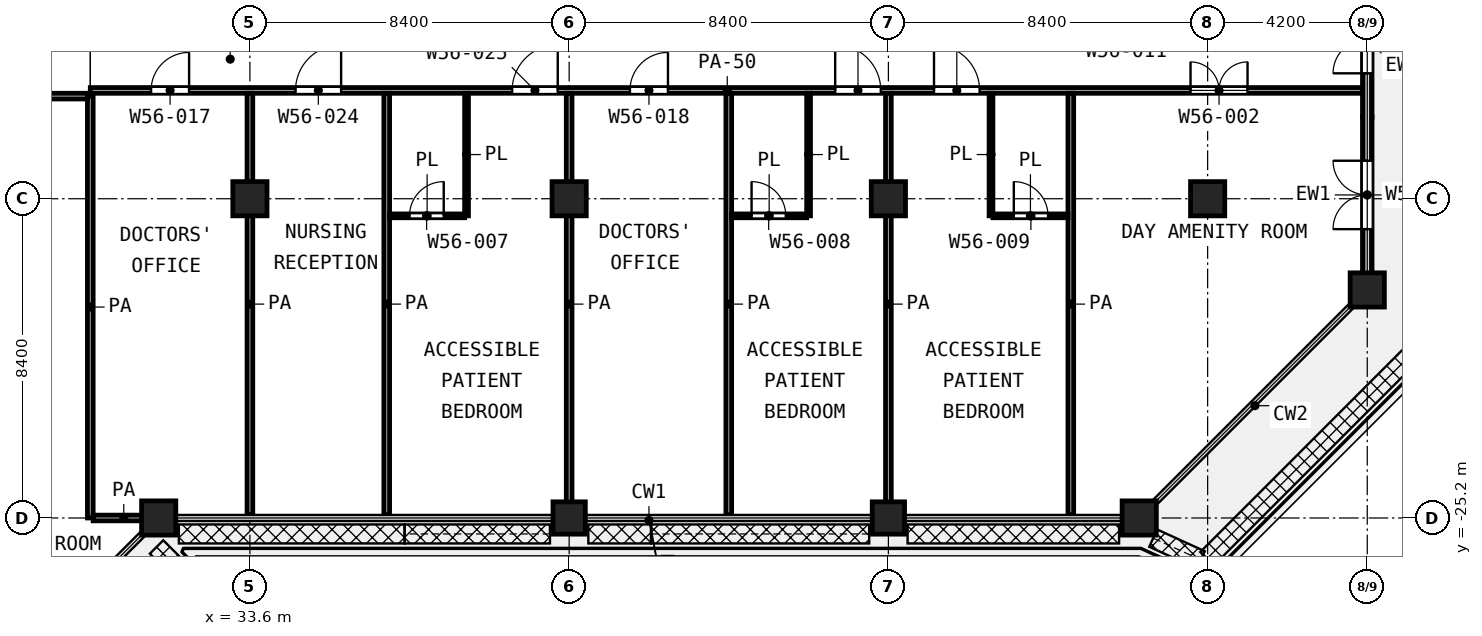
"""IFC4 building model, lengths in metres.
Left out: names, types, materials, properties, quantities, classifications, styles, units other than length and angle.
Written with IfcOpenShell. Run it as: python <this file> out.ifc"""

import sys

from ifc_helpers import new_model, si_unit, direction, frame, frame_2d, origin, origin_2d, place, context, subcontext, project, spatial, rectangle, extrude, element, fill, save


model = new_model("IFC4")
c1 = context("Model", 3, precision=1e-05, world=origin(), true_north=direction((0.0, 1.0)))
c2 = subcontext(c1, "Body", "Model", "MODEL_VIEW")
j1 = project(units=[si_unit("LENGTHUNIT", "METRE"), si_unit("PLANEANGLEUNIT", "RADIAN")], contexts=[c1])
p1 = place(None, origin())
s1 = spatial("IfcSite", under=j1, at=p1, CompositionType="ELEMENT")
p2 = place(p1, origin())
s2 = spatial("IfcBuilding", under=s1, at=p2, CompositionType="ELEMENT")
p3 = place(p2, frame((0.0, 0.0, 264.2)))
s3 = spatial("IfcBuildingStorey", under=s2, at=p3, CompositionType="ELEMENT", Elevation=264.2)
for number, where, z_axis, x_axis in (
    (1, (33.6, -16.8, 0.0), (0.0, 0.0, 1.0), (1.0, 0.0, 0.0)),
    (2, (42.0, -16.8, 0.0), (0.0, 0.0, 1.0), (1.0, 0.0, 0.0)),
    (3, (50.4, -16.8, 0.0), (0.0, 0.0, 1.0), (1.0, 0.0, 0.0)),
    (4, (58.8, -16.8, 0.0), (0.0, 0.0, 1.0), (1.0, 0.0, 0.0)),
    (5, (63.0, -19.2, 0.0), (0.0, 0.0, 1.0), (1.0, 0.0, 0.0)),
    (6, (31.2, -25.2, 0.0), (0.0, 0.0, 1.0), (1.0, 0.0, 0.0)),
):
    element("IfcColumn", number, at=place(p3, frame(where, z_axis=z_axis, x_axis=x_axis)), inside=s3, PredefinedType="COLUMN", context=c2, shape_type="SweptSolid", body=[
        extrude(rectangle(XDim=0.9, YDim=0.9, at=origin_2d()), origin(), (0.0, 0.0, 1.0), 4.2),
    ])
for number, where, z_axis, x_axis in (
    (7, (42.0, -25.2, 0.0), (0.0, 0.0, 1.0), (1.0, 0.0, 0.0)),
    (8, (50.4, -25.2, 0.0), (0.0, 0.0, 1.0), (1.0, 0.0, 0.0)),
):
    element("IfcColumn", number, at=place(p3, frame(where, z_axis=z_axis, x_axis=x_axis)), inside=s3, PredefinedType="COLUMN", context=c2, shape_type="SweptSolid", body=[
        extrude(rectangle(XDim=0.85, YDim=0.85, at=origin_2d()), origin(), (0.0, 0.0, 1.0), 4.2),
    ])
p4 = place(p3, frame((57.0, -25.2, 0.0), z_axis=(0.0, 0.0, 1.0), x_axis=(1.0, 0.0, 0.0)))
e9 = element("IfcColumn", 9, at=p4, inside=s3, PredefinedType="COLUMN", context=c2, shape_type="SweptSolid", body=[
    extrude(rectangle(XDim=0.9, YDim=0.9, at=origin_2d()), origin(), (0.0, 0.0, 1.0), 4.2),
])
p5 = place(p3, frame((63.0, -18.75, 0.0), z_axis=(0.0, 0.0, 1.0), x_axis=(0.0, 1.0, 0.0)))
e10 = element("IfcWall", 10, at=p5, inside=s3, PredefinedType="SOLIDWALL", context=c2, shape_type="SweptSolid", body=[
    extrude(rectangle(XDim=4.1, YDim=0.25, at=frame_2d((2.05, 0.0))), origin(), (0.0, 0.0, 1.0), 2.58),
])
p6 = place(p5, frame((1.15, 0.0, 0.0)))
e11 = element("IfcOpeningElement", 11, at=p6, cuts=e10, PredefinedType="OPENING", context=c2, shape_type="SweptSolid", body=[
    extrude(rectangle(XDim=1.8, YDim=2.1, at=frame_2d((0.9, 1.05))), frame((0.0, 0.135, 0.0), z_axis=(0.0, -1.0, 0.0), x_axis=(1.0, 0.0, 0.0)), (0.0, 0.0, 1.0), 0.27),
])
p7 = place(p3, frame((63.0, -14.65, 0.0), z_axis=(0.0, 0.0, 1.0), x_axis=(0.0, 1.0, 0.0)))
e12 = element("IfcWall", 12, at=p7, inside=s3, PredefinedType="SOLIDWALL", context=c2, shape_type="SweptSolid", body=[
    extrude(rectangle(XDim=4.1, YDim=0.25, at=frame_2d((2.05, 0.0))), origin(), (0.0, 0.0, 1.0), 2.58),
])
p8 = place(p7, frame((1.15, 0.0, 0.0)))
e13 = element("IfcOpeningElement", 13, at=p8, cuts=e12, PredefinedType="OPENING", context=c2, shape_type="SweptSolid", body=[
    extrude(rectangle(XDim=1.8, YDim=2.1, at=frame_2d((0.9, 1.05))), frame((0.0, 0.135, 0.0), z_axis=(0.0, -1.0, 0.0), x_axis=(1.0, 0.0, 0.0)), (0.0, 0.0, 1.0), 0.27),
])
p9 = place(p3, frame((37.275, -17.25, 0.0), z_axis=(0.0, 0.0, 1.0), x_axis=(1.0, 0.0, 0.0)))
e14 = element("IfcWall", 14, at=p9, inside=s3, PredefinedType="PARTITIONING", context=c2, shape_type="SweptSolid", body=[
    extrude(rectangle(XDim=1.975, YDim=0.1, at=frame_2d((0.988, 0.0))), origin(), (0.0, 0.0, 1.0), 3.6),
])
p10 = place(p9, frame((0.525, 0.0, 0.0)))
e15 = element("IfcOpeningElement", 15, at=p10, cuts=e14, PredefinedType="OPENING", context=c2, shape_type="SweptSolid", body=[
    extrude(rectangle(XDim=0.9, YDim=2.1, at=frame_2d((0.45, 1.05))), frame((0.0, 0.06, 0.0), z_axis=(0.0, -1.0, 0.0), x_axis=(1.0, 0.0, 0.0)), (0.0, 0.0, 1.0), 0.12),
])
p11 = place(p3, frame((46.275, -17.25, 0.0), z_axis=(0.0, 0.0, 1.0), x_axis=(1.0, 0.0, 0.0)))
e16 = element("IfcWall", 16, at=p11, inside=s3, PredefinedType="PARTITIONING", context=c2, shape_type="SweptSolid", body=[
    extrude(rectangle(XDim=1.975, YDim=0.1, at=frame_2d((0.988, 0.0))), origin(), (0.0, 0.0, 1.0), 3.6),
])
p12 = place(p11, frame((0.525, 0.0, 0.0)))
e17 = element("IfcOpeningElement", 17, at=p12, cuts=e16, PredefinedType="OPENING", context=c2, shape_type="SweptSolid", body=[
    extrude(rectangle(XDim=0.9, YDim=2.1, at=frame_2d((0.45, 1.05))), frame((0.0, 0.06, 0.0), z_axis=(0.0, -1.0, 0.0), x_axis=(1.0, 0.0, 0.0)), (0.0, 0.0, 1.0), 0.12),
])
p13 = place(p3, frame((53.15, -17.25, 0.0), z_axis=(0.0, 0.0, 1.0), x_axis=(1.0, 0.0, 0.0)))
e18 = element("IfcWall", 18, at=p13, inside=s3, PredefinedType="PARTITIONING", context=c2, shape_type="SweptSolid", body=[
    extrude(rectangle(XDim=1.975, YDim=0.1, at=frame_2d((0.988, 0.0))), origin(), (0.0, 0.0, 1.0), 3.6),
])
p14 = place(p13, frame((0.55, 0.0, 0.0)))
e19 = element("IfcOpeningElement", 19, at=p14, cuts=e18, PredefinedType="OPENING", context=c2, shape_type="SweptSolid", body=[
    extrude(rectangle(XDim=0.9, YDim=2.1, at=frame_2d((0.45, 1.05))), frame((0.0, 0.06, 0.0), z_axis=(0.0, -1.0, 0.0), x_axis=(1.0, 0.0, 0.0)), (0.0, 0.0, 1.0), 0.12),
])
for number, where, z_axis, x_axis in (
    (20, (39.3, -17.25, 0.0), (0.0, 0.0, 1.0), (0.0, 1.0, 0.0)),
    (21, (48.3, -17.25, 0.0), (0.0, 0.0, 1.0), (0.0, 1.0, 0.0)),
    (22, (53.1, -17.25, 0.0), (0.0, 0.0, 1.0), (0.0, 1.0, 0.0)),
):
    element("IfcWall", number, at=place(p3, frame(where, z_axis=z_axis, x_axis=x_axis)), inside=s3, PredefinedType="PARTITIONING", context=c2, shape_type="SweptSolid", body=[
        extrude(rectangle(XDim=3.225, YDim=0.1, at=frame_2d((1.613, 0.0))), origin(), (0.0, 0.0, 1.0), 3.6),
    ])
p15 = place(p3, frame((29.475, -25.2, 0.0), z_axis=(0.0, 0.0, 1.0), x_axis=(1.0, 0.0, 0.0)))
e23 = element("IfcWall", 23, at=p15, inside=s3, PredefinedType="PARTITIONING", context=c2, shape_type="SweptSolid", body=[
    extrude(rectangle(XDim=1.612, YDim=0.15, at=frame_2d((0.806, 0.0))), origin(), (0.0, 0.0, 1.0), 3.6),
])
p16 = place(p3, frame((24.8, -14.1, 0.0), z_axis=(0.0, 0.0, 1.0), x_axis=(1.0, 0.0, 0.0)))
e24 = element("IfcWall", 24, at=p16, inside=s3, PredefinedType="PARTITIONING", context=c2, shape_type="SweptSolid", body=[
    extrude(rectangle(XDim=4.525, YDim=0.15, at=frame_2d((2.262, 0.0))), origin(), (0.0, 0.0, 1.0), 3.6),
])
p17 = place(p16, frame((1.75, 0.0, 0.0)))
e25 = element("IfcOpeningElement", 25, at=p17, cuts=e24, PredefinedType="OPENING", context=c2, shape_type="SweptSolid", body=[
    extrude(rectangle(XDim=1.5, YDim=2.1, at=frame_2d((0.75, 1.05))), frame((0.0, 0.085, 0.0), z_axis=(0.0, -1.0, 0.0), x_axis=(1.0, 0.0, 0.0)), (0.0, 0.0, 1.0), 0.17),
])
p18 = place(p3, frame((29.4, -13.95, 0.0), z_axis=(0.0, 0.0, 1.0), x_axis=(1.0, 0.0, 0.0)))
e26 = element("IfcWall", 26, at=p18, inside=s3, PredefinedType="PARTITIONING", context=c2, shape_type="SweptSolid", body=[
    extrude(rectangle(XDim=33.52, YDim=0.15, at=frame_2d((16.76, 0.0))), origin(), (0.0, 0.0, 1.0), 2.7),
])
p19 = place(p18, frame((1.6, 0.0, 0.0)))
e27 = element("IfcOpeningElement", 27, at=p19, cuts=e26, PredefinedType="OPENING", context=c2, shape_type="SweptSolid", body=[
    extrude(rectangle(XDim=1.0, YDim=2.1, at=frame_2d((0.5, 1.05))), frame((0.0, 0.085, 0.0), z_axis=(0.0, -1.0, 0.0), x_axis=(1.0, 0.0, 0.0)), (0.0, 0.0, 1.0), 0.17),
])
p20 = place(p18, frame((5.4, 0.0, 0.0)))
e28 = element("IfcOpeningElement", 28, at=p20, cuts=e26, PredefinedType="OPENING", context=c2, shape_type="SweptSolid", body=[
    extrude(rectangle(XDim=1.2, YDim=2.1, at=frame_2d((0.6, 1.05))), frame((0.0, 0.085, 0.0), z_axis=(0.0, -1.0, 0.0), x_axis=(1.0, 0.0, 0.0)), (0.0, 0.0, 1.0), 0.17),
])
p21 = place(p18, frame((11.1, 0.0, 0.0)))
e29 = element("IfcOpeningElement", 29, at=p21, cuts=e26, PredefinedType="OPENING", context=c2, shape_type="SweptSolid", body=[
    extrude(rectangle(XDim=1.2, YDim=2.1, at=frame_2d((0.6, 1.05))), frame((0.0, 0.085, 0.0), z_axis=(0.0, -1.0, 0.0), x_axis=(1.0, 0.0, 0.0)), (0.0, 0.0, 1.0), 0.17),
])
p22 = place(p18, frame((14.2, 0.0, 0.0)))
e30 = element("IfcOpeningElement", 30, at=p22, cuts=e26, PredefinedType="OPENING", context=c2, shape_type="SweptSolid", body=[
    extrude(rectangle(XDim=1.0, YDim=2.1, at=frame_2d((0.5, 1.05))), frame((0.0, 0.085, 0.0), z_axis=(0.0, -1.0, 0.0), x_axis=(1.0, 0.0, 0.0)), (0.0, 0.0, 1.0), 0.17),
])
p23 = place(p18, frame((19.6, 0.0, 0.0)))
e31 = element("IfcOpeningElement", 31, at=p23, cuts=e26, PredefinedType="OPENING", context=c2, shape_type="SweptSolid", body=[
    extrude(rectangle(XDim=1.2, YDim=2.1, at=frame_2d((0.6, 1.05))), frame((0.0, 0.085, 0.0), z_axis=(0.0, -1.0, 0.0), x_axis=(1.0, 0.0, 0.0)), (0.0, 0.0, 1.0), 0.17),
])
p24 = place(p18, frame((22.2, 0.0, 0.0)))
e32 = element("IfcOpeningElement", 32, at=p24, cuts=e26, PredefinedType="OPENING", context=c2, shape_type="SweptSolid", body=[
    extrude(rectangle(XDim=1.2, YDim=2.1, at=frame_2d((0.6, 1.05))), frame((0.0, 0.085, 0.0), z_axis=(0.0, -1.0, 0.0), x_axis=(1.0, 0.0, 0.0)), (0.0, 0.0, 1.0), 0.17),
])
p25 = place(p18, frame((28.95, 0.0, 0.0)))
e33 = element("IfcOpeningElement", 33, at=p25, cuts=e26, PredefinedType="OPENING", context=c2, shape_type="SweptSolid", body=[
    extrude(rectangle(XDim=1.5, YDim=2.1, at=frame_2d((0.75, 1.05))), frame((0.0, 0.085, 0.0), z_axis=(0.0, -1.0, 0.0), x_axis=(1.0, 0.0, 0.0)), (0.0, 0.0, 1.0), 0.17),
])
p26 = place(p3, frame((29.4, -25.2, 0.0), z_axis=(0.0, 0.0, 1.0), x_axis=(0.0, 1.0, 0.0)))
e34 = element("IfcWall", 34, at=p26, inside=s3, PredefinedType="PARTITIONING", context=c2, shape_type="SweptSolid", body=[
    extrude(rectangle(XDim=11.1, YDim=0.15, at=frame_2d((5.55, 0.0))), origin(), (0.0, 0.0, 1.0), 3.6),
])
for number, where, z_axis, x_axis in (
    (35, (33.6, -25.12, 0.0), (0.0, 0.0, 1.0), (0.0, 1.0, 0.0)),
    (36, (37.2, -25.12, 0.0), (0.0, 0.0, 1.0), (0.0, 1.0, 0.0)),
    (37, (42.0, -25.12, 0.0), (0.0, 0.0, 1.0), (0.0, 1.0, 0.0)),
    (38, (46.2, -25.12, 0.0), (0.0, 0.0, 1.0), (0.0, 1.0, 0.0)),
    (39, (50.4, -25.12, 0.0), (0.0, 0.0, 1.0), (0.0, 1.0, 0.0)),
    (40, (55.2, -25.12, 0.0), (0.0, 0.0, 1.0), (0.0, 1.0, 0.0)),
):
    element("IfcWall", number, at=place(p3, frame(where, z_axis=z_axis, x_axis=x_axis)), inside=s3, PredefinedType="PARTITIONING", context=c2, shape_type="SweptSolid", body=[
        extrude(rectangle(XDim=11.095, YDim=0.15, at=frame_2d((5.548, 0.0))), origin(), (0.0, 0.0, 1.0), 3.6),
    ])
p27 = place(p6, origin())
e41 = element("IfcDoor", 41, at=p27, inside=s3, OperationType="DOUBLE_DOOR_SINGLE_SWING", PredefinedType="DOOR", context=c2, shape_type="SweptSolid", body=[
    extrude(rectangle(XDim=1.8, YDim=2.1, at=frame_2d((0.9, 1.05))), frame((0.0, 0.025, 0.0), z_axis=(0.0, -1.0, 0.0), x_axis=(1.0, 0.0, 0.0)), (0.0, 0.0, 1.0), 0.05),
])
fill(e11, e41)
p28 = place(p8, origin())
e42 = element("IfcDoor", 42, at=p28, inside=s3, OperationType="DOUBLE_DOOR_SINGLE_SWING", PredefinedType="DOOR", context=c2, shape_type="SweptSolid", body=[
    extrude(rectangle(XDim=1.8, YDim=2.1, at=frame_2d((0.9, 1.05))), frame((0.0, 0.025, 0.0), z_axis=(0.0, -1.0, 0.0), x_axis=(1.0, 0.0, 0.0)), (0.0, 0.0, 1.0), 0.05),
])
fill(e13, e42)
p29 = place(p19, origin())
e43 = element("IfcDoor", 43, at=p29, inside=s3, OperationType="SINGLE_SWING_RIGHT", PredefinedType="DOOR", context=c2, shape_type="SweptSolid", body=[
    extrude(rectangle(XDim=1.0, YDim=2.1, at=frame_2d((0.5, 1.05))), frame((0.0, 0.025, 0.0), z_axis=(0.0, -1.0, 0.0), x_axis=(1.0, 0.0, 0.0)), (0.0, 0.0, 1.0), 0.05),
])
fill(e27, e43)
p30 = place(p20, origin())
e44 = element("IfcDoor", 44, at=p30, inside=s3, OperationType="SINGLE_SWING_RIGHT", PredefinedType="DOOR", context=c2, shape_type="SweptSolid", body=[
    extrude(rectangle(XDim=1.2, YDim=2.1, at=frame_2d((0.6, 1.05))), frame((0.0, 0.025, 0.0), z_axis=(0.0, -1.0, 0.0), x_axis=(1.0, 0.0, 0.0)), (0.0, 0.0, 1.0), 0.05),
])
fill(e28, e44)
p31 = place(p21, origin())
e45 = element("IfcDoor", 45, at=p31, inside=s3, OperationType="SINGLE_SWING_RIGHT", PredefinedType="DOOR", context=c2, shape_type="SweptSolid", body=[
    extrude(rectangle(XDim=1.2, YDim=2.1, at=frame_2d((0.6, 1.05))), frame((0.0, 0.025, 0.0), z_axis=(0.0, -1.0, 0.0), x_axis=(1.0, 0.0, 0.0)), (0.0, 0.0, 1.0), 0.05),
])
fill(e29, e45)
p32 = place(p10, origin())
e46 = element("IfcDoor", 46, at=p32, inside=s3, OperationType="SINGLE_SWING_RIGHT", PredefinedType="DOOR", context=c2, shape_type="SweptSolid", body=[
    extrude(rectangle(XDim=0.9, YDim=2.1, at=frame_2d((0.45, 1.05))), frame((0.0, 0.025, 0.0), z_axis=(0.0, -1.0, 0.0), x_axis=(1.0, 0.0, 0.0)), (0.0, 0.0, 1.0), 0.05),
])
fill(e15, e46)
p33 = place(p22, origin())
e47 = element("IfcDoor", 47, at=p33, inside=s3, OperationType="SINGLE_SWING_RIGHT", PredefinedType="DOOR", context=c2, shape_type="SweptSolid", body=[
    extrude(rectangle(XDim=1.0, YDim=2.1, at=frame_2d((0.5, 1.05))), frame((0.0, 0.025, 0.0), z_axis=(0.0, -1.0, 0.0), x_axis=(1.0, 0.0, 0.0)), (0.0, 0.0, 1.0), 0.05),
])
fill(e30, e47)
p34 = place(p23, origin())
e48 = element("IfcDoor", 48, at=p34, inside=s3, OperationType="SINGLE_SWING_LEFT", PredefinedType="DOOR", context=c2, shape_type="SweptSolid", body=[
    extrude(rectangle(XDim=1.2, YDim=2.1, at=frame_2d((0.6, 1.05))), frame((0.0, 0.025, 0.0), z_axis=(0.0, -1.0, 0.0), x_axis=(1.0, 0.0, 0.0)), (0.0, 0.0, 1.0), 0.05),
])
fill(e31, e48)
p35 = place(p12, origin())
e49 = element("IfcDoor", 49, at=p35, inside=s3, OperationType="SINGLE_SWING_LEFT", PredefinedType="DOOR", context=c2, shape_type="SweptSolid", body=[
    extrude(rectangle(XDim=0.9, YDim=2.1, at=frame_2d((0.45, 1.05))), frame((0.0, 0.025, 0.0), z_axis=(0.0, -1.0, 0.0), x_axis=(1.0, 0.0, 0.0)), (0.0, 0.0, 1.0), 0.05),
])
fill(e17, e49)
p36 = place(p24, origin())
e50 = element("IfcDoor", 50, at=p36, inside=s3, OperationType="SINGLE_SWING_LEFT", PredefinedType="DOOR", context=c2, shape_type="SweptSolid", body=[
    extrude(rectangle(XDim=1.2, YDim=2.1, at=frame_2d((0.6, 1.05))), frame((0.0, 0.025, 0.0), z_axis=(0.0, -1.0, 0.0), x_axis=(1.0, 0.0, 0.0)), (0.0, 0.0, 1.0), 0.05),
])
fill(e32, e50)
p37 = place(p14, origin())
e51 = element("IfcDoor", 51, at=p37, inside=s3, OperationType="SINGLE_SWING_LEFT", PredefinedType="DOOR", context=c2, shape_type="SweptSolid", body=[
    extrude(rectangle(XDim=0.9, YDim=2.1, at=frame_2d((0.45, 1.05))), frame((0.0, 0.025, 0.0), z_axis=(0.0, -1.0, 0.0), x_axis=(1.0, 0.0, 0.0)), (0.0, 0.0, 1.0), 0.05),
])
fill(e19, e51)
p38 = place(p25, origin())
e52 = element("IfcDoor", 52, at=p38, inside=s3, OperationType="DOUBLE_DOOR_SINGLE_SWING", PredefinedType="DOOR", context=c2, shape_type="SweptSolid", body=[
    extrude(rectangle(XDim=1.5, YDim=2.1, at=frame_2d((0.75, 1.05))), frame((0.0, 0.025, 0.0), z_axis=(0.0, -1.0, 0.0), x_axis=(1.0, 0.0, 0.0)), (0.0, 0.0, 1.0), 0.05),
])
fill(e33, e52)
save(model, sys.argv[1])
